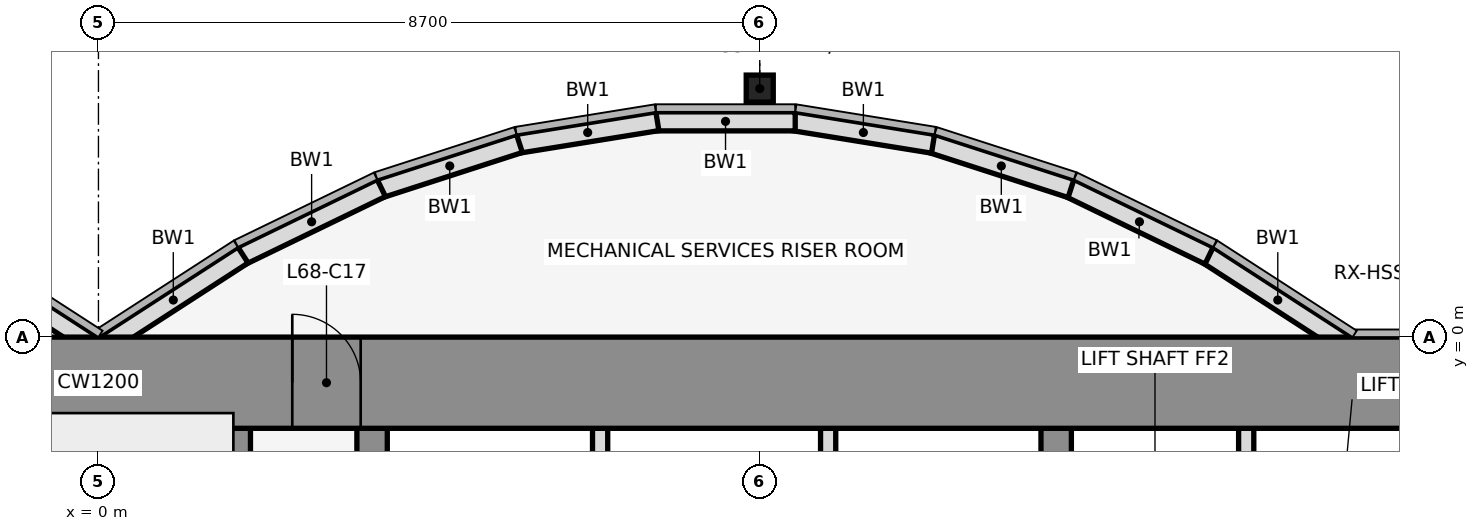
"""IFC4 building model, lengths in metres.
Left out: names, types, materials, properties, quantities, classifications, styles, units other than length and angle.
Written with IfcOpenShell. Run it as: python <this file> out.ifc"""

import sys

from ifc_helpers import new_model, si_unit, direction, frame, frame_2d, origin, origin_2d, place, context, subcontext, project, spatial, rectangle, hollow_rectangle, extrude, element, fill, save


model = new_model("IFC4")
c1 = context("Model", 3, precision=1e-05, world=origin(), true_north=direction((0.0, 1.0)))
c2 = subcontext(c1, "Body", "Model", "MODEL_VIEW")
j1 = project(units=[si_unit("LENGTHUNIT", "METRE"), si_unit("PLANEANGLEUNIT", "RADIAN")], contexts=[c1])
p1 = place(None, origin())
s1 = spatial("IfcSite", under=j1, at=p1, CompositionType="ELEMENT")
p2 = place(p1, origin())
s2 = spatial("IfcBuilding", under=s1, at=p2, CompositionType="ELEMENT")
p3 = place(p2, frame((0.0, 0.0, 302.0)))
s3 = spatial("IfcBuildingStorey", under=s2, at=p3, CompositionType="ELEMENT", Elevation=302.0)
p4 = place(p3, frame((8.7, 3.269, 0.0), z_axis=(0.0, 0.0, 1.0), x_axis=(1.0, 0.0, 0.0)))
e1 = element("IfcColumn", 1, at=p4, inside=s3, PredefinedType="COLUMN", context=c2, shape_type="SweptSolid", body=[
    extrude(hollow_rectangle(XDim=0.356, YDim=0.356, WallThickness=0.012, at=origin_2d()), origin(), (0.0, 0.0, 1.0), 4.5),
])
p5 = place(p3, frame((16.432, -0.105, 0.0), z_axis=(0.0, 0.0, 1.0), x_axis=(-0.83981312244, 0.542875602121, 0.0)))
e2 = element("IfcWall", 2, at=p5, inside=s3, PredefinedType="STANDARD", context=c2, shape_type="SweptSolid", body=[
    extrude(rectangle(XDim=2.183, YDim=0.25, at=frame_2d((1.091, 0.0))), origin(), (0.0, 0.0, 1.0), 4.35),
])
p6 = place(p3, frame((14.612, 1.073, 0.0), z_axis=(0.0, 0.0, 1.0), x_axis=(-0.89982408427, 0.436252928206, 0.0)))
e3 = element("IfcWall", 3, at=p6, inside=s3, PredefinedType="STANDARD", context=c2, shape_type="SweptSolid", body=[
    extrude(rectangle(XDim=2.038, YDim=0.25, at=frame_2d((1.019, 0.0))), origin(), (0.0, 0.0, 1.0), 4.35),
])
p7 = place(p3, frame((12.795, 1.955, 0.0), z_axis=(0.0, 0.0, 1.0), x_axis=(-0.951495806175, 0.307661714928, 0.0)))
e4 = element("IfcWall", 4, at=p7, inside=s3, PredefinedType="STANDARD", context=c2, shape_type="SweptSolid", body=[
    extrude(rectangle(XDim=1.927, YDim=0.25, at=frame_2d((0.963, 0.0))), origin(), (0.0, 0.0, 1.0), 4.35),
])
p8 = place(p3, frame((10.98, 2.543, 0.0), z_axis=(0.0, 0.0, 1.0), x_axis=(-0.987181718931, 0.159600293885, 0.0)))
e5 = element("IfcWall", 5, at=p8, inside=s3, PredefinedType="STANDARD", context=c2, shape_type="SweptSolid", body=[
    extrude(rectangle(XDim=1.857, YDim=0.25, at=frame_2d((0.929, 0.0))), origin(), (0.0, 0.0, 1.0), 4.35),
])
p9 = place(p3, frame((9.167, 2.838, 0.0), z_axis=(0.0, 0.0, 1.0), x_axis=(-1.0, 0.0, 0.0)))
e6 = element("IfcWall", 6, at=p9, inside=s3, PredefinedType="STANDARD", context=c2, shape_type="SweptSolid", body=[
    extrude(rectangle(XDim=1.833, YDim=0.25, at=frame_2d((0.917, 0.0))), origin(), (0.0, 0.0, 1.0), 4.35),
])
p10 = place(p3, frame((7.353, 2.84, 0.0), z_axis=(0.0, 0.0, 1.0), x_axis=(-0.987181718931, -0.159600293885, 0.0)))
e7 = element("IfcWall", 7, at=p10, inside=s3, PredefinedType="STANDARD", context=c2, shape_type="SweptSolid", body=[
    extrude(rectangle(XDim=1.857, YDim=0.25, at=frame_2d((0.929, 0.0))), origin(), (0.0, 0.0, 1.0), 4.35),
])
p11 = place(p3, frame((5.538, 2.548, 0.0), z_axis=(0.0, 0.0, 1.0), x_axis=(-0.951495806175, -0.307661714928, 0.0)))
e8 = element("IfcWall", 8, at=p11, inside=s3, PredefinedType="STANDARD", context=c2, shape_type="SweptSolid", body=[
    extrude(rectangle(XDim=1.927, YDim=0.25, at=frame_2d((0.963, 0.0))), origin(), (0.0, 0.0, 1.0), 4.35),
])
p12 = place(p3, frame((3.721, 1.962, 0.0), z_axis=(0.0, 0.0, 1.0), x_axis=(-0.89982408427, -0.436252928206, 0.0)))
e9 = element("IfcWall", 9, at=p12, inside=s3, PredefinedType="STANDARD", context=c2, shape_type="SweptSolid", body=[
    extrude(rectangle(XDim=2.038, YDim=0.25, at=frame_2d((1.019, 0.0))), origin(), (0.0, 0.0, 1.0), 4.35),
])
for number, where, z_axis, x_axis in (
    (10, (1.901, 1.08, 0.0), (0.0, 0.0, 1.0), (-0.84, -0.543, 0.0)),
    (11, (-0.068, -0.105, 0.0), (0.0, 0.0, 1.0), (-0.84, 0.543, 0.0)),
):
    element("IfcWall", number, at=place(p3, frame(where, z_axis=z_axis, x_axis=x_axis)), inside=s3, PredefinedType="STANDARD", context=c2, shape_type="SweptSolid", body=[
        extrude(rectangle(XDim=2.183, YDim=0.25, at=frame_2d((1.091, 0.0))), origin(), (0.0, 0.0, 1.0), 4.35),
    ])
p13 = place(p3, frame((1.8, -11.8, 0.0), z_axis=(0.0, 0.0, 1.0), x_axis=(0.0, 1.0, 0.0)))
e12 = element("IfcWall", 12, at=p13, inside=s3, PredefinedType="SHEAR", context=c2, shape_type="SweptSolid", body=[
    extrude(rectangle(XDim=10.6, YDim=0.4, at=frame_2d((5.3, 0.0))), origin(), (0.0, 0.0, 1.0), 4.5),
])
p14 = place(p3, frame((3.6, -11.8, 0.0), z_axis=(0.0, 0.0, 1.0), x_axis=(0.0, 1.0, 0.0)))
e13 = element("IfcWall", 13, at=p14, inside=s3, PredefinedType="SHEAR", context=c2, shape_type="SweptSolid", body=[
    extrude(rectangle(XDim=10.6, YDim=0.4, at=frame_2d((5.3, 0.0))), origin(), (0.0, 0.0, 1.0), 4.5),
])
p15 = place(p14, frame((1.35, 0.0, 0.0)))
e14 = element("IfcOpeningElement", 14, at=p15, cuts=e13, PredefinedType="OPENING", context=c2, shape_type="SweptSolid", body=[
    extrude(rectangle(XDim=0.9, YDim=2.1, at=frame_2d((0.45, 1.05))), frame((0.0, 0.212, 0.0), z_axis=(0.0, -1.0, 0.0), x_axis=(1.0, 0.0, 0.0)), (0.0, 0.0, 1.0), 0.424),
])
for number, where, z_axis, x_axis in (
    (15, (6.6, -4.6, 0.0), (0.0, 0.0, 1.0), (0.0, 1.0, 0.0)),
    (16, (9.6, -4.6, 0.0), (0.0, 0.0, 1.0), (0.0, 1.0, 0.0)),
):
    element("IfcWall", number, at=place(p3, frame(where, z_axis=z_axis, x_axis=x_axis)), inside=s3, PredefinedType="PARTITIONING", context=c2, shape_type="SweptSolid", body=[
        extrude(rectangle(XDim=3.4, YDim=0.2, at=frame_2d((1.7, 0.0))), origin(), (0.0, 0.0, 1.0), 3.418),
    ])
p16 = place(p3, frame((12.6, -11.8, 0.0), z_axis=(0.0, 0.0, 1.0), x_axis=(0.0, 1.0, 0.0)))
e17 = element("IfcWall", 17, at=p16, inside=s3, PredefinedType="SHEAR", context=c2, shape_type="SweptSolid", body=[
    extrude(rectangle(XDim=10.6, YDim=0.4, at=frame_2d((5.3, 0.0))), origin(), (0.0, 0.0, 1.0), 4.5),
])
p17 = place(p16, frame((4.75, 0.0, 0.0)))
e18 = element("IfcOpeningElement", 18, at=p17, cuts=e17, PredefinedType="OPENING", context=c2, shape_type="SweptSolid", body=[
    extrude(rectangle(XDim=1.1, YDim=2.1, at=frame_2d((0.55, 1.05))), frame((0.0, 0.212, 0.0), z_axis=(0.0, -1.0, 0.0), x_axis=(1.0, 0.0, 0.0)), (0.0, 0.0, 1.0), 0.424),
])
p18 = place(p3, frame((15.1, -4.6, 0.0), z_axis=(0.0, 0.0, 1.0), x_axis=(0.0, 1.0, 0.0)))
e19 = element("IfcWall", 19, at=p18, inside=s3, PredefinedType="PARTITIONING", context=c2, shape_type="SweptSolid", body=[
    extrude(rectangle(XDim=3.4, YDim=0.2, at=frame_2d((1.7, 0.0))), origin(), (0.0, 0.0, 1.0), 3.418),
])
p19 = place(p3, frame((-22.0, -0.6, 0.0), z_axis=(0.0, 0.0, 1.0), x_axis=(1.0, 0.0, 0.0)))
e20 = element("IfcWall", 20, at=p19, inside=s3, PredefinedType="SHEAR", context=c2, shape_type="SweptSolid", body=[
    extrude(rectangle(XDim=44.0, YDim=1.2, at=frame_2d((22.0, 0.0))), origin(), (0.0, 0.0, 1.0), 4.5),
])
p20 = place(p19, frame((18.55, 0.0, 0.0)))
e21 = element("IfcOpeningElement", 21, at=p20, cuts=e20, PredefinedType="OPENING", context=c2, shape_type="SweptSolid", body=[
    extrude(rectangle(XDim=0.9, YDim=2.1, at=frame_2d((0.45, 1.05))), frame((0.0, 0.612, 0.0), z_axis=(0.0, -1.0, 0.0), x_axis=(1.0, 0.0, 0.0)), (0.0, 0.0, 1.0), 1.224),
])
p21 = place(p19, frame((24.55, 0.0, 0.0)))
e22 = element("IfcOpeningElement", 22, at=p21, cuts=e20, PredefinedType="OPENING", context=c2, shape_type="SweptSolid", body=[
    extrude(rectangle(XDim=0.9, YDim=2.1, at=frame_2d((0.45, 1.05))), frame((0.0, 0.612, 0.0), z_axis=(0.0, -1.0, 0.0), x_axis=(1.0, 0.0, 0.0)), (0.0, 0.0, 1.0), 1.224),
])
p22 = place(p21, origin())
e23 = element("IfcDoor", 23, at=p22, inside=s3, OperationType="SINGLE_SWING_LEFT", PredefinedType="DOOR", context=c2, shape_type="SweptSolid", body=[
    extrude(rectangle(XDim=0.9, YDim=2.1, at=frame_2d((0.45, 1.05))), frame((0.0, 0.025, 0.0), z_axis=(0.0, -1.0, 0.0), x_axis=(1.0, 0.0, 0.0)), (0.0, 0.0, 1.0), 0.05),
])
fill(e22, e23)
save(model, sys.argv[1])
